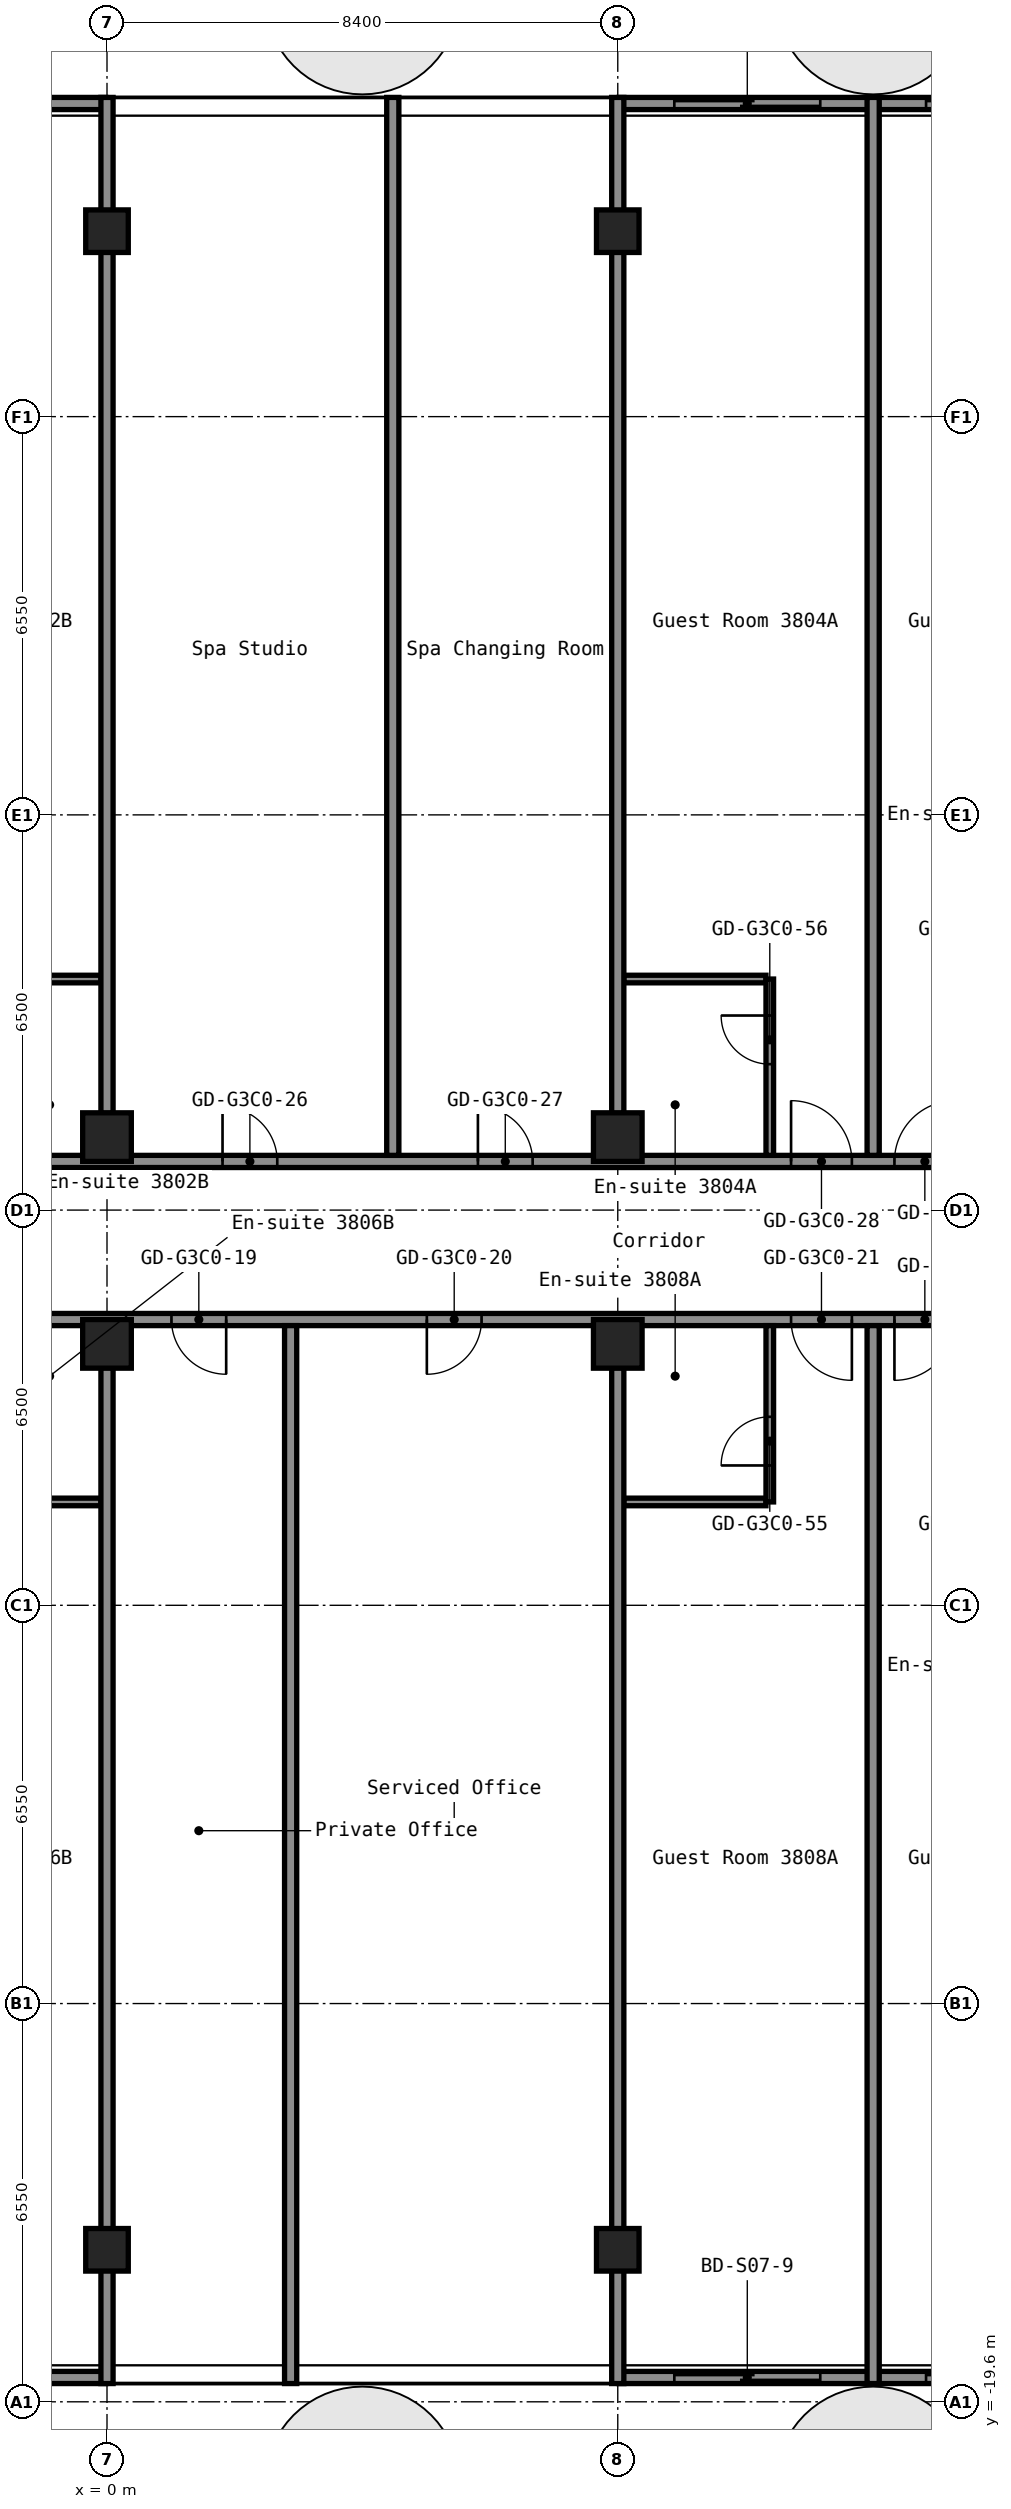
"""IFC4 building model, lengths in metres.
Left out: names, types, materials, properties, quantities, classifications, styles, units other than length and angle.
Written with IfcOpenShell. Run it as: python <this file> out.ifc"""

import sys

from ifc_helpers import new_model, si_unit, direction, frame, frame_2d, origin, origin_2d, place, context, subcontext, project, spatial, rectangle, hollow_rectangle, extrude, element, fill, save


model = new_model("IFC4")
c1 = context("Model", 3, precision=1e-05, world=origin(), true_north=direction((0.0, 1.0)))
c2 = subcontext(c1, "Body", "Model", "MODEL_VIEW")
j1 = project(units=[si_unit("LENGTHUNIT", "METRE"), si_unit("PLANEANGLEUNIT", "RADIAN")], contexts=[c1])
p1 = place(None, origin())
s1 = spatial("IfcSite", under=j1, at=p1, CompositionType="ELEMENT")
p2 = place(p1, origin())
s2 = spatial("IfcBuilding", under=s1, at=p2, CompositionType="ELEMENT")
p3 = place(p2, frame((0.0, 0.0, 137.4)))
s3 = spatial("IfcBuildingStorey", under=s2, at=p3, CompositionType="ELEMENT", Elevation=137.4)
p4 = place(p3, frame((0.0, -17.1, 0.0), z_axis=(0.0, 0.0, 1.0), x_axis=(1.0, 0.0, 0.0)))
e1 = element("IfcColumn", 1, at=p4, inside=s3, PredefinedType="COLUMN", context=c2, shape_type="SweptSolid", body=[
    extrude(hollow_rectangle(XDim=0.7, YDim=0.7, WallThickness=0.028, at=origin_2d()), origin(), (0.0, 0.0, 1.0), 2.75),
])
for number, where, z_axis, x_axis in (
    (2, (0.0, -2.2, 0.0), (0.0, 0.0, 1.0), (1.0, 0.0, 0.0)),
    (3, (0.0, 1.2, 0.0), (0.0, 0.0, 1.0), (1.0, 0.0, 0.0)),
):
    element("IfcColumn", number, at=place(p3, frame(where, z_axis=z_axis, x_axis=x_axis)), inside=s3, PredefinedType="COLUMN", context=c2, shape_type="SweptSolid", body=[
        extrude(hollow_rectangle(XDim=0.8, YDim=0.8, WallThickness=0.032, at=origin_2d()), origin(), (0.0, 0.0, 1.0), 2.75),
    ])
for number, where, z_axis, x_axis in (
    (4, (0.0, 16.1, 0.0), (0.0, 0.0, 1.0), (1.0, 0.0, 0.0)),
    (5, (8.4, -17.1, 0.0), (0.0, 0.0, 1.0), (1.0, 0.0, 0.0)),
):
    element("IfcColumn", number, at=place(p3, frame(where, z_axis=z_axis, x_axis=x_axis)), inside=s3, PredefinedType="COLUMN", context=c2, shape_type="SweptSolid", body=[
        extrude(hollow_rectangle(XDim=0.7, YDim=0.7, WallThickness=0.028, at=origin_2d()), origin(), (0.0, 0.0, 1.0), 2.75),
    ])
for number, where, z_axis, x_axis in (
    (6, (8.4, -2.2, 0.0), (0.0, 0.0, 1.0), (1.0, 0.0, 0.0)),
    (7, (8.4, 1.2, 0.0), (0.0, 0.0, 1.0), (1.0, 0.0, 0.0)),
):
    element("IfcColumn", number, at=place(p3, frame(where, z_axis=z_axis, x_axis=x_axis)), inside=s3, PredefinedType="COLUMN", context=c2, shape_type="SweptSolid", body=[
        extrude(hollow_rectangle(XDim=0.8, YDim=0.8, WallThickness=0.032, at=origin_2d()), origin(), (0.0, 0.0, 1.0), 2.75),
    ])
p5 = place(p3, frame((8.4, 16.1, 0.0), z_axis=(0.0, 0.0, 1.0), x_axis=(1.0, 0.0, 0.0)))
e8 = element("IfcColumn", 8, at=p5, inside=s3, PredefinedType="COLUMN", context=c2, shape_type="SweptSolid", body=[
    extrude(hollow_rectangle(XDim=0.7, YDim=0.7, WallThickness=0.028, at=origin_2d()), origin(), (0.0, 0.0, 1.0), 2.75),
])
for number, where, z_axis, x_axis in (
    (9, (-2.438, -4.8, 0.0), (0.0, 0.0, 1.0), (1.0, 0.0, 0.0)),
    (10, (8.5, -4.8, 0.0), (0.0, 0.0, 1.0), (1.0, 0.0, 0.0)),
):
    element("IfcWall", number, at=place(p3, frame(where, z_axis=z_axis, x_axis=x_axis)), inside=s3, PredefinedType="PARTITIONING", context=c2, shape_type="SweptSolid", body=[
        extrude(rectangle(XDim=2.337, YDim=0.125, at=frame_2d((1.169, 0.0))), origin(), (0.0, 0.0, 1.0), 2.75),
    ])
p6 = place(p3, frame((-16.8, -1.8, 0.0), z_axis=(0.0, 0.0, 1.0), x_axis=(1.0, 0.0, 0.0)))
e11 = element("IfcWall", 11, at=p6, inside=s3, PredefinedType="PARTITIONING", context=c2, shape_type="SweptSolid", body=[
    extrude(rectangle(XDim=33.6, YDim=0.2, at=frame_2d((16.8, 0.0))), origin(), (0.0, 0.0, 1.0), 2.75),
])
p7 = place(p6, frame((2.0, 0.0, 0.0)))
e12 = element("IfcOpeningElement", 12, at=p7, cuts=e11, PredefinedType="OPENING", context=c2, shape_type="SweptSolid", body=[
    extrude(rectangle(XDim=1.0, YDim=2.1, at=frame_2d((0.5, 1.05))), frame((0.0, 0.11, 0.0), z_axis=(0.0, -1.0, 0.0), x_axis=(1.0, 0.0, 0.0)), (0.0, 0.0, 1.0), 0.22),
])
p8 = place(p6, frame((11.25, 0.0, 0.0)))
e13 = element("IfcOpeningElement", 13, at=p8, cuts=e11, PredefinedType="OPENING", context=c2, shape_type="SweptSolid", body=[
    extrude(rectangle(XDim=1.0, YDim=2.1, at=frame_2d((0.5, 1.05))), frame((0.0, 0.11, 0.0), z_axis=(0.0, -1.0, 0.0), x_axis=(1.0, 0.0, 0.0)), (0.0, 0.0, 1.0), 0.22),
])
p9 = place(p6, frame((12.95, 0.0, 0.0)))
e14 = element("IfcOpeningElement", 14, at=p9, cuts=e11, PredefinedType="OPENING", context=c2, shape_type="SweptSolid", body=[
    extrude(rectangle(XDim=1.0, YDim=2.1, at=frame_2d((0.5, 1.05))), frame((0.0, 0.11, 0.0), z_axis=(0.0, -1.0, 0.0), x_axis=(1.0, 0.0, 0.0)), (0.0, 0.0, 1.0), 0.22),
])
p10 = place(p6, frame((17.86, 0.0, 0.0)))
e15 = element("IfcOpeningElement", 15, at=p10, cuts=e11, PredefinedType="OPENING", context=c2, shape_type="SweptSolid", body=[
    extrude(rectangle(XDim=0.9, YDim=2.1, at=frame_2d((0.45, 1.05))), frame((0.0, 0.11, 0.0), z_axis=(0.0, -1.0, 0.0), x_axis=(1.0, 0.0, 0.0)), (0.0, 0.0, 1.0), 0.22),
])
p11 = place(p6, frame((22.06, 0.0, 0.0)))
e16 = element("IfcOpeningElement", 16, at=p11, cuts=e11, PredefinedType="OPENING", context=c2, shape_type="SweptSolid", body=[
    extrude(rectangle(XDim=0.9, YDim=2.1, at=frame_2d((0.45, 1.05))), frame((0.0, 0.11, 0.0), z_axis=(0.0, -1.0, 0.0), x_axis=(1.0, 0.0, 0.0)), (0.0, 0.0, 1.0), 0.22),
])
p12 = place(p6, frame((28.05, 0.0, 0.0)))
e17 = element("IfcOpeningElement", 17, at=p12, cuts=e11, PredefinedType="OPENING", context=c2, shape_type="SweptSolid", body=[
    extrude(rectangle(XDim=1.0, YDim=2.1, at=frame_2d((0.5, 1.05))), frame((0.0, 0.11, 0.0), z_axis=(0.0, -1.0, 0.0), x_axis=(1.0, 0.0, 0.0)), (0.0, 0.0, 1.0), 0.22),
])
p13 = place(p6, frame((29.75, 0.0, 0.0)))
e18 = element("IfcOpeningElement", 18, at=p13, cuts=e11, PredefinedType="OPENING", context=c2, shape_type="SweptSolid", body=[
    extrude(rectangle(XDim=1.0, YDim=2.1, at=frame_2d((0.5, 1.05))), frame((0.0, 0.11, 0.0), z_axis=(0.0, -1.0, 0.0), x_axis=(1.0, 0.0, 0.0)), (0.0, 0.0, 1.0), 0.22),
])
p14 = place(p3, frame((-16.8, 0.8, 0.0), z_axis=(0.0, 0.0, 1.0), x_axis=(1.0, 0.0, 0.0)))
e19 = element("IfcWall", 19, at=p14, inside=s3, PredefinedType="PARTITIONING", context=c2, shape_type="SweptSolid", body=[
    extrude(rectangle(XDim=33.6, YDim=0.2, at=frame_2d((16.8, 0.0))), origin(), (0.0, 0.0, 1.0), 2.75),
])
p15 = place(p14, frame((2.0, 0.0, 0.0)))
e20 = element("IfcOpeningElement", 20, at=p15, cuts=e19, PredefinedType="OPENING", context=c2, shape_type="SweptSolid", body=[
    extrude(rectangle(XDim=1.0, YDim=2.1, at=frame_2d((0.5, 1.05))), frame((0.0, 0.11, 0.0), z_axis=(0.0, -1.0, 0.0), x_axis=(1.0, 0.0, 0.0)), (0.0, 0.0, 1.0), 0.22),
])
p16 = place(p14, frame((11.25, 0.0, 0.0)))
e21 = element("IfcOpeningElement", 21, at=p16, cuts=e19, PredefinedType="OPENING", context=c2, shape_type="SweptSolid", body=[
    extrude(rectangle(XDim=1.0, YDim=2.1, at=frame_2d((0.5, 1.05))), frame((0.0, 0.11, 0.0), z_axis=(0.0, -1.0, 0.0), x_axis=(1.0, 0.0, 0.0)), (0.0, 0.0, 1.0), 0.22),
])
p17 = place(p14, frame((12.95, 0.0, 0.0)))
e22 = element("IfcOpeningElement", 22, at=p17, cuts=e19, PredefinedType="OPENING", context=c2, shape_type="SweptSolid", body=[
    extrude(rectangle(XDim=1.0, YDim=2.1, at=frame_2d((0.5, 1.05))), frame((0.0, 0.11, 0.0), z_axis=(0.0, -1.0, 0.0), x_axis=(1.0, 0.0, 0.0)), (0.0, 0.0, 1.0), 0.22),
])
p18 = place(p14, frame((18.7, 0.0, 0.0)))
e23 = element("IfcOpeningElement", 23, at=p18, cuts=e19, PredefinedType="OPENING", context=c2, shape_type="SweptSolid", body=[
    extrude(rectangle(XDim=0.9, YDim=2.1, at=frame_2d((0.45, 1.05))), frame((0.0, 0.11, 0.0), z_axis=(0.0, -1.0, 0.0), x_axis=(1.0, 0.0, 0.0)), (0.0, 0.0, 1.0), 0.22),
])
p19 = place(p14, frame((22.9, 0.0, 0.0)))
e24 = element("IfcOpeningElement", 24, at=p19, cuts=e19, PredefinedType="OPENING", context=c2, shape_type="SweptSolid", body=[
    extrude(rectangle(XDim=0.9, YDim=2.1, at=frame_2d((0.45, 1.05))), frame((0.0, 0.11, 0.0), z_axis=(0.0, -1.0, 0.0), x_axis=(1.0, 0.0, 0.0)), (0.0, 0.0, 1.0), 0.22),
])
p20 = place(p14, frame((28.05, 0.0, 0.0)))
e25 = element("IfcOpeningElement", 25, at=p20, cuts=e19, PredefinedType="OPENING", context=c2, shape_type="SweptSolid", body=[
    extrude(rectangle(XDim=1.0, YDim=2.1, at=frame_2d((0.5, 1.05))), frame((0.0, 0.11, 0.0), z_axis=(0.0, -1.0, 0.0), x_axis=(1.0, 0.0, 0.0)), (0.0, 0.0, 1.0), 0.22),
])
p21 = place(p14, frame((29.75, 0.0, 0.0)))
e26 = element("IfcOpeningElement", 26, at=p21, cuts=e19, PredefinedType="OPENING", context=c2, shape_type="SweptSolid", body=[
    extrude(rectangle(XDim=1.0, YDim=2.1, at=frame_2d((0.5, 1.05))), frame((0.0, 0.11, 0.0), z_axis=(0.0, -1.0, 0.0), x_axis=(1.0, 0.0, 0.0)), (0.0, 0.0, 1.0), 0.22),
])
for number, where, z_axis, x_axis in (
    (27, (-2.438, 3.8, 0.0), (0.0, 0.0, 1.0), (1.0, 0.0, 0.0)),
    (28, (8.5, 3.8, 0.0), (0.0, 0.0, 1.0), (1.0, 0.0, 0.0)),
):
    element("IfcWall", number, at=place(p3, frame(where, z_axis=z_axis, x_axis=x_axis)), inside=s3, PredefinedType="PARTITIONING", context=c2, shape_type="SweptSolid", body=[
        extrude(rectangle(XDim=2.337, YDim=0.125, at=frame_2d((1.169, 0.0))), origin(), (0.0, 0.0, 1.0), 2.75),
    ])
for number, where, z_axis, x_axis in (
    (29, (0.0, -19.3, 0.0), (0.0, 0.0, 1.0), (0.0, 1.0, 0.0)),
    (30, (0.0, 1.59, 0.0), (0.0, 0.0, 1.0), (0.0, 1.0, 0.0)),
):
    element("IfcWall", number, at=place(p3, frame(where, z_axis=z_axis, x_axis=x_axis)), inside=s3, PredefinedType="PARTITIONING", context=c2, shape_type="SweptSolid", body=[
        extrude(rectangle(XDim=16.71, YDim=0.2, at=frame_2d((8.355, 0.0))), origin(), (0.0, 0.0, 1.0), 2.75),
    ])
for number, where, z_axis, x_axis in (
    (31, (3.02, -19.3, 0.0), (0.0, 0.0, 1.0), (0.0, 1.0, 0.0)),
    (32, (4.7, 0.9, 0.0), (0.0, 0.0, 1.0), (0.0, 1.0, 0.0)),
):
    element("IfcWall", number, at=place(p3, frame(where, z_axis=z_axis, x_axis=x_axis)), inside=s3, PredefinedType="PARTITIONING", context=c2, shape_type="SweptSolid", body=[
        extrude(rectangle(XDim=17.4, YDim=0.2, at=frame_2d((8.7, 0.0))), origin(), (0.0, 0.0, 1.0), 2.75),
    ])
for number, where, z_axis, x_axis in (
    (33, (8.4, -19.3, 0.0), (0.0, 0.0, 1.0), (0.0, 1.0, 0.0)),
    (34, (8.4, 1.59, 0.0), (0.0, 0.0, 1.0), (0.0, 1.0, 0.0)),
):
    element("IfcWall", number, at=place(p3, frame(where, z_axis=z_axis, x_axis=x_axis)), inside=s3, PredefinedType="PARTITIONING", context=c2, shape_type="SweptSolid", body=[
        extrude(rectangle(XDim=16.71, YDim=0.2, at=frame_2d((8.355, 0.0))), origin(), (0.0, 0.0, 1.0), 2.75),
    ])
p22 = place(p3, frame((10.9, -4.8, 0.0), z_axis=(0.0, 0.0, 1.0), x_axis=(0.0, 1.0, 0.0)))
e35 = element("IfcWall", 35, at=p22, inside=s3, PredefinedType="PARTITIONING", context=c2, shape_type="SweptSolid", body=[
    extrude(rectangle(XDim=2.9, YDim=0.125, at=frame_2d((1.45, 0.0))), origin(), (0.0, 0.0, 1.0), 2.75),
])
p23 = place(p22, frame((0.6, 0.0, 0.0)))
e36 = element("IfcOpeningElement", 36, at=p23, cuts=e35, PredefinedType="OPENING", context=c2, shape_type="SweptSolid", body=[
    extrude(rectangle(XDim=0.8, YDim=2.1, at=frame_2d((0.4, 1.05))), frame((0.0, 0.073, 0.0), z_axis=(0.0, -1.0, 0.0), x_axis=(1.0, 0.0, 0.0)), (0.0, 0.0, 1.0), 0.145),
])
p24 = place(p3, frame((10.9, 0.9, 0.0), z_axis=(0.0, 0.0, 1.0), x_axis=(0.0, 1.0, 0.0)))
e37 = element("IfcWall", 37, at=p24, inside=s3, PredefinedType="PARTITIONING", context=c2, shape_type="SweptSolid", body=[
    extrude(rectangle(XDim=2.9, YDim=0.125, at=frame_2d((1.45, 0.0))), origin(), (0.0, 0.0, 1.0), 2.75),
])
p25 = place(p24, frame((1.5, 0.0, 0.0)))
e38 = element("IfcOpeningElement", 38, at=p25, cuts=e37, PredefinedType="OPENING", context=c2, shape_type="SweptSolid", body=[
    extrude(rectangle(XDim=0.8, YDim=2.1, at=frame_2d((0.4, 1.05))), frame((0.0, 0.073, 0.0), z_axis=(0.0, -1.0, 0.0), x_axis=(1.0, 0.0, 0.0)), (0.0, 0.0, 1.0), 0.145),
])
for number, where, z_axis, x_axis in (
    (39, (12.6, -19.3, 0.0), (0.0, 0.0, 1.0), (0.0, 1.0, 0.0)),
    (40, (12.6, 0.9, 0.0), (0.0, 0.0, 1.0), (0.0, 1.0, 0.0)),
):
    element("IfcWall", number, at=place(p3, frame(where, z_axis=z_axis, x_axis=x_axis)), inside=s3, PredefinedType="PARTITIONING", context=c2, shape_type="SweptSolid", body=[
        extrude(rectangle(XDim=17.4, YDim=0.2, at=frame_2d((8.7, 0.0))), origin(), (0.0, 0.0, 1.0), 2.75),
    ])
p26 = place(p3, frame((16.78, 18.2, 0.0), z_axis=(0.0, 0.0, 1.0), x_axis=(-1.0, 0.0, 0.0)))
p27 = place(p26, frame((0.91, 0.0, 0.0)))
p28 = place(p27, frame((2.4, 0.0, 0.0), z_axis=(0.0, 0.0, 1.0), x_axis=(-1.0, 0.0, 0.0)))
e41 = element("IfcDoor", 41, at=p28, inside=s3, OperationType="SLIDING_TO_LEFT", PredefinedType="DOOR", context=c2, shape_type="SweptSolid", body=[
    extrude(rectangle(XDim=2.4, YDim=2.2, at=frame_2d((1.2, 1.1))), frame((0.0, 0.025, 0.0), z_axis=(0.0, -1.0, 0.0), x_axis=(1.0, 0.0, 0.0)), (0.0, 0.0, 1.0), 0.05),
])
p29 = place(p3, frame((12.64, 18.2, 0.0), z_axis=(0.0, 0.0, 1.0), x_axis=(-1.0, 0.0, 0.0)))
p30 = place(p29, frame((0.91, 0.0, 0.0)))
p31 = place(p30, frame((2.4, 0.0, 0.0), z_axis=(0.0, 0.0, 1.0), x_axis=(-1.0, 0.0, 0.0)))
e42 = element("IfcDoor", 42, at=p31, inside=s3, OperationType="SLIDING_TO_LEFT", PredefinedType="DOOR", context=c2, shape_type="SweptSolid", body=[
    extrude(rectangle(XDim=2.4, YDim=2.2, at=frame_2d((1.2, 1.1))), frame((0.0, 0.025, 0.0), z_axis=(0.0, -1.0, 0.0), x_axis=(1.0, 0.0, 0.0)), (0.0, 0.0, 1.0), 0.05),
])
p32 = place(p3, frame((8.42, -19.2, 0.0), z_axis=(0.0, 0.0, 1.0), x_axis=(1.0, 0.0, 0.0)))
p33 = place(p32, frame((0.91, 0.0, 0.0)))
p34 = place(p33, frame((2.4, 0.0, 0.0), z_axis=(0.0, 0.0, 1.0), x_axis=(-1.0, 0.0, 0.0)))
e43 = element("IfcDoor", 43, at=p34, inside=s3, OperationType="SLIDING_TO_LEFT", PredefinedType="DOOR", context=c2, shape_type="SweptSolid", body=[
    extrude(rectangle(XDim=2.4, YDim=2.2, at=frame_2d((1.2, 1.1))), frame((0.0, 0.025, 0.0), z_axis=(0.0, -1.0, 0.0), x_axis=(1.0, 0.0, 0.0)), (0.0, 0.0, 1.0), 0.05),
])
p35 = place(p3, frame((12.56, -19.2, 0.0), z_axis=(0.0, 0.0, 1.0), x_axis=(1.0, 0.0, 0.0)))
p36 = place(p35, frame((0.91, 0.0, 0.0)))
p37 = place(p36, frame((2.4, 0.0, 0.0), z_axis=(0.0, 0.0, 1.0), x_axis=(-1.0, 0.0, 0.0)))
e44 = element("IfcDoor", 44, at=p37, inside=s3, OperationType="SLIDING_TO_LEFT", PredefinedType="DOOR", context=c2, shape_type="SweptSolid", body=[
    extrude(rectangle(XDim=2.4, YDim=2.2, at=frame_2d((1.2, 1.1))), frame((0.0, 0.025, 0.0), z_axis=(0.0, -1.0, 0.0), x_axis=(1.0, 0.0, 0.0)), (0.0, 0.0, 1.0), 0.05),
])
p38 = place(p10, origin())
e45 = element("IfcDoor", 45, at=p38, inside=s3, OperationType="SINGLE_SWING_RIGHT", PredefinedType="DOOR", context=c2, shape_type="SweptSolid", body=[
    extrude(rectangle(XDim=0.9, YDim=2.1, at=frame_2d((0.45, 1.05))), frame((0.0, 0.025, 0.0), z_axis=(0.0, -1.0, 0.0), x_axis=(1.0, 0.0, 0.0)), (0.0, 0.0, 1.0), 0.05),
])
fill(e15, e45)
p39 = place(p11, origin())
e46 = element("IfcDoor", 46, at=p39, inside=s3, OperationType="SINGLE_SWING_LEFT", PredefinedType="DOOR", context=c2, shape_type="SweptSolid", body=[
    extrude(rectangle(XDim=0.9, YDim=2.1, at=frame_2d((0.45, 1.05))), frame((0.0, 0.025, 0.0), z_axis=(0.0, -1.0, 0.0), x_axis=(1.0, 0.0, 0.0)), (0.0, 0.0, 1.0), 0.05),
])
fill(e16, e46)
p40 = place(p12, origin())
e47 = element("IfcDoor", 47, at=p40, inside=s3, OperationType="SINGLE_SWING_RIGHT", PredefinedType="DOOR", context=c2, shape_type="SweptSolid", body=[
    extrude(rectangle(XDim=1.0, YDim=2.1, at=frame_2d((0.5, 1.05))), frame((0.0, 0.025, 0.0), z_axis=(0.0, -1.0, 0.0), x_axis=(1.0, 0.0, 0.0)), (0.0, 0.0, 1.0), 0.05),
])
fill(e17, e47)
p41 = place(p13, origin())
e48 = element("IfcDoor", 48, at=p41, inside=s3, OperationType="SINGLE_SWING_LEFT", PredefinedType="DOOR", context=c2, shape_type="SweptSolid", body=[
    extrude(rectangle(XDim=1.0, YDim=2.1, at=frame_2d((0.5, 1.05))), frame((0.0, 0.025, 0.0), z_axis=(0.0, -1.0, 0.0), x_axis=(1.0, 0.0, 0.0)), (0.0, 0.0, 1.0), 0.05),
])
fill(e18, e48)
p42 = place(p18, origin())
e49 = element("IfcDoor", 49, at=p42, inside=s3, OperationType="SINGLE_SWING_RIGHT", PredefinedType="DOOR", context=c2, shape_type="SweptSolid", body=[
    extrude(rectangle(XDim=0.9, YDim=2.1, at=frame_2d((0.45, 1.05))), frame((0.0, 0.025, 0.0), z_axis=(0.0, -1.0, 0.0), x_axis=(1.0, 0.0, 0.0)), (0.0, 0.0, 1.0), 0.05),
])
fill(e23, e49)
p43 = place(p19, origin())
e50 = element("IfcDoor", 50, at=p43, inside=s3, OperationType="SINGLE_SWING_RIGHT", PredefinedType="DOOR", context=c2, shape_type="SweptSolid", body=[
    extrude(rectangle(XDim=0.9, YDim=2.1, at=frame_2d((0.45, 1.05))), frame((0.0, 0.025, 0.0), z_axis=(0.0, -1.0, 0.0), x_axis=(1.0, 0.0, 0.0)), (0.0, 0.0, 1.0), 0.05),
])
fill(e24, e50)
p44 = place(p20, origin())
e51 = element("IfcDoor", 51, at=p44, inside=s3, OperationType="SINGLE_SWING_RIGHT", PredefinedType="DOOR", context=c2, shape_type="SweptSolid", body=[
    extrude(rectangle(XDim=1.0, YDim=2.1, at=frame_2d((0.5, 1.05))), frame((0.0, 0.025, 0.0), z_axis=(0.0, -1.0, 0.0), x_axis=(1.0, 0.0, 0.0)), (0.0, 0.0, 1.0), 0.05),
])
fill(e25, e51)
p45 = place(p21, origin())
e52 = element("IfcDoor", 52, at=p45, inside=s3, OperationType="SINGLE_SWING_LEFT", PredefinedType="DOOR", context=c2, shape_type="SweptSolid", body=[
    extrude(rectangle(XDim=1.0, YDim=2.1, at=frame_2d((0.5, 1.05))), frame((0.0, 0.025, 0.0), z_axis=(0.0, -1.0, 0.0), x_axis=(1.0, 0.0, 0.0)), (0.0, 0.0, 1.0), 0.05),
])
fill(e26, e52)
p46 = place(p23, origin())
e53 = element("IfcDoor", 53, at=p46, inside=s3, OperationType="SINGLE_SWING_RIGHT", PredefinedType="DOOR", context=c2, shape_type="SweptSolid", body=[
    extrude(rectangle(XDim=0.8, YDim=2.1, at=frame_2d((0.4, 1.05))), frame((0.0, 0.025, 0.0), z_axis=(0.0, -1.0, 0.0), x_axis=(1.0, 0.0, 0.0)), (0.0, 0.0, 1.0), 0.05),
])
fill(e36, e53)
p47 = place(p25, origin())
e54 = element("IfcDoor", 54, at=p47, inside=s3, OperationType="SINGLE_SWING_LEFT", PredefinedType="DOOR", context=c2, shape_type="SweptSolid", body=[
    extrude(rectangle(XDim=0.8, YDim=2.1, at=frame_2d((0.4, 1.05))), frame((0.0, 0.025, 0.0), z_axis=(0.0, -1.0, 0.0), x_axis=(1.0, 0.0, 0.0)), (0.0, 0.0, 1.0), 0.05),
])
fill(e38, e54)
save(model, sys.argv[1])
